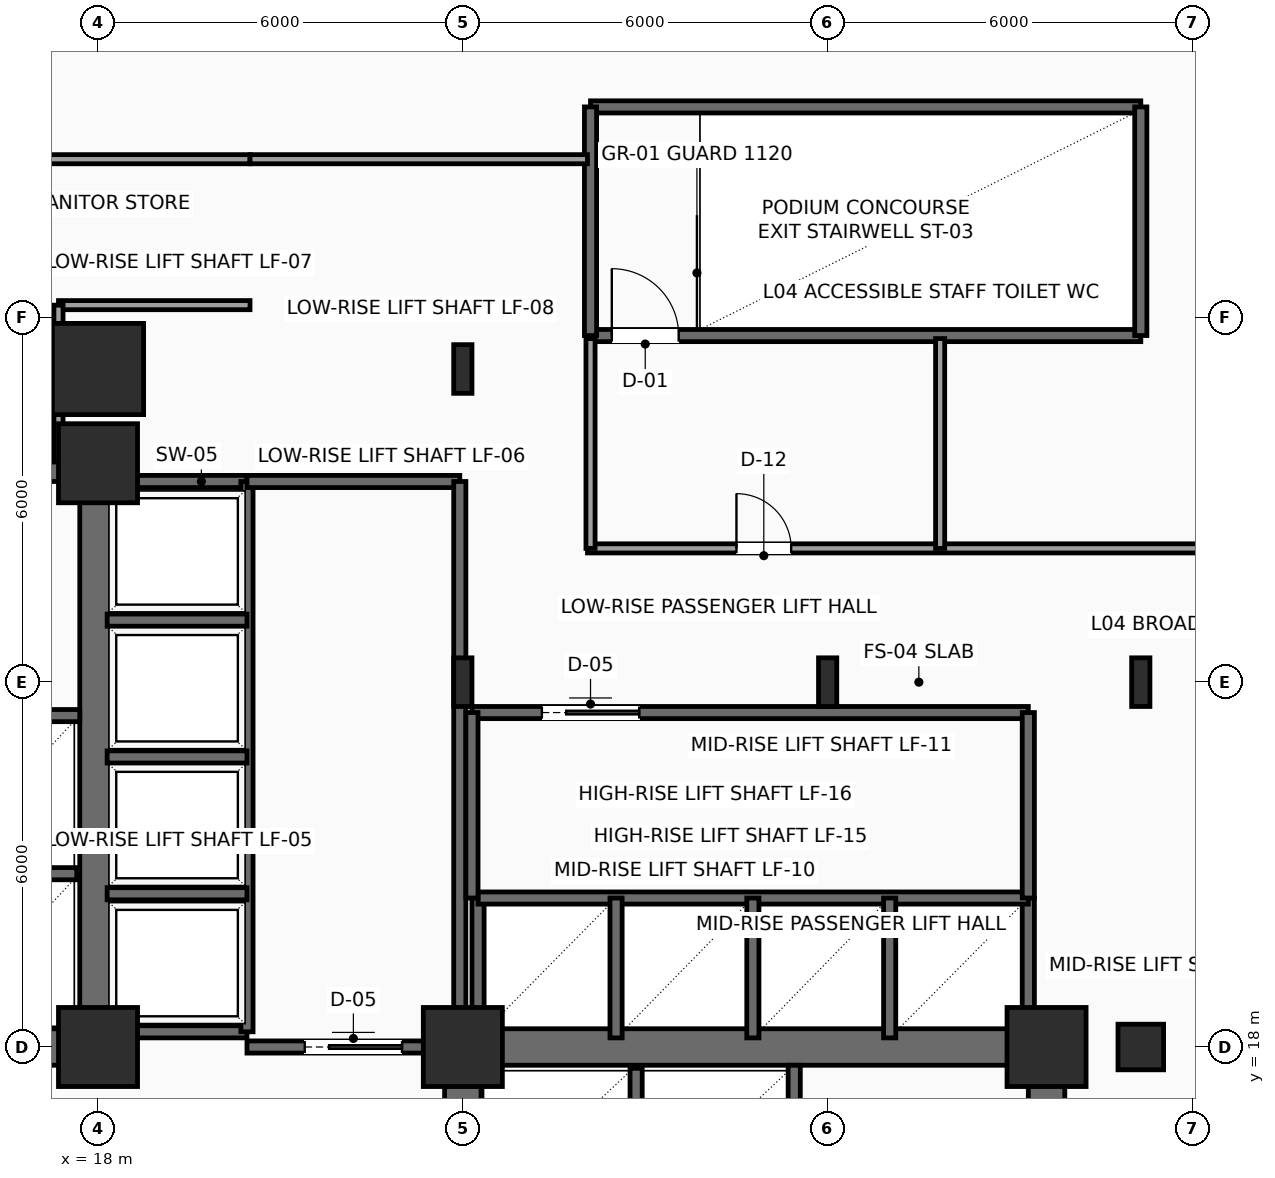
"""IFC4 building model, lengths in metres.
Left out: names, types, materials, properties, quantities, classifications, styles, units other than length and angle.
Written with IfcOpenShell. Run it as: python <this file> out.ifc"""

import sys

from ifc_helpers import new_model, si_unit, direction, frame, frame_2d, origin, origin_2d, place, context, subcontext, project, spatial, rectangle, hollow_rectangle, i_section, extrude, element, fill, save


model = new_model("IFC4")
c1 = context("Model", 3, precision=1e-05, world=origin(), true_north=direction((0.0, 1.0)))
c2 = subcontext(c1, "Body", "Model", "MODEL_VIEW")
j1 = project(units=[si_unit("LENGTHUNIT", "METRE"), si_unit("PLANEANGLEUNIT", "RADIAN")], contexts=[c1])
p1 = place(None, origin())
s1 = spatial("IfcSite", under=j1, at=p1, CompositionType="ELEMENT")
p2 = place(p1, origin())
s2 = spatial("IfcBuilding", under=s1, at=p2, CompositionType="ELEMENT")
p3 = place(p2, frame((0.0, 0.0, 21.9)))
s3 = spatial("IfcBuildingStorey", under=s2, at=p3, CompositionType="ELEMENT", Elevation=21.9)
for number, where, z_axis, x_axis in (
    (1, (18.0, 18.0, 0.0), (0.0, 0.0, 1.0), (1.0, 0.0, 0.0)),
    (2, (18.0, 27.6, 0.0), (0.0, 0.0, 1.0), (1.0, 0.0, 0.0)),
    (3, (24.0, 18.0, 0.0), (0.0, 0.0, 1.0), (1.0, 0.0, 0.0)),
    (4, (33.6, 18.0, 0.0), (0.0, 0.0, 1.0), (1.0, 0.0, 0.0)),
):
    element("IfcColumn", number, at=place(p3, frame(where, z_axis=z_axis, x_axis=x_axis)), inside=s3, PredefinedType="COLUMN", context=c2, shape_type="SweptSolid", body=[
        extrude(rectangle(XDim=1.3, YDim=1.3, at=origin_2d()), origin(), (0.0, 0.0, 1.0), 5.7),
    ])
p4 = place(p3, frame((18.0, 29.15, 0.0), z_axis=(0.0, 0.0, 1.0), x_axis=(1.0, 0.0, 0.0)))
e5 = element("IfcColumn", 5, at=p4, inside=s3, PredefinedType="COLUMN", context=c2, shape_type="SweptSolid", body=[
    extrude(rectangle(XDim=1.5, YDim=1.5, at=origin_2d()), origin(), (0.0, 0.0, 1.0), 5.35),
])
for number, where, z_axis, x_axis in (
    (6, (24.0, 24.0, 0.0), (0.0, 0.0, 1.0), (1.0, 0.0, 0.0)),
    (7, (24.0, 29.15, 0.0), (0.0, 0.0, 1.0), (1.0, 0.0, 0.0)),
    (8, (30.0, 24.0, 0.0), (0.0, 0.0, 1.0), (1.0, 0.0, 0.0)),
):
    element("IfcColumn", number, at=place(p3, frame(where, z_axis=z_axis, x_axis=x_axis)), inside=s3, PredefinedType="COLUMN", context=c2, shape_type="SweptSolid", body=[
        extrude(i_section(OverallWidth=0.3, OverallDepth=0.8, WebThickness=0.018, FlangeThickness=0.033, FilletRadius=0.03, at=origin_2d()), origin(), (0.0, 0.0, 1.0), 5.35),
    ])
p5 = place(p3, frame((35.15, 18.0, 0.0), z_axis=(0.0, 0.0, 1.0), x_axis=(1.0, 0.0, 0.0)))
e9 = element("IfcColumn", 9, at=p5, inside=s3, PredefinedType="COLUMN", context=c2, shape_type="SweptSolid", body=[
    extrude(hollow_rectangle(XDim=0.75, YDim=0.75, WallThickness=0.035, InnerFilletRadius=0.035, OuterFilletRadius=0.05, at=origin_2d()), origin(), (0.0, 0.0, 1.0), 5.35),
])
p6 = place(p3, frame((35.15, 24.0, 0.0), z_axis=(0.0, 0.0, 1.0), x_axis=(1.0, 0.0, 0.0)))
e10 = element("IfcColumn", 10, at=p6, inside=s3, PredefinedType="COLUMN", context=c2, shape_type="SweptSolid", body=[
    extrude(i_section(OverallWidth=0.3, OverallDepth=0.8, WebThickness=0.018, FlangeThickness=0.033, FilletRadius=0.03, at=origin_2d()), origin(), (0.0, 0.0, 1.0), 5.35),
])
p7 = place(p3, frame((6.0, 18.0, 0.0), z_axis=(0.0, 0.0, 1.0), x_axis=(1.0, 0.0, 0.0)))
e11 = element("IfcWall", 11, at=p7, inside=s3, PredefinedType="SHEAR", context=c2, shape_type="SweptSolid", body=[
    extrude(rectangle(XDim=12.0, YDim=0.6, at=frame_2d((6.0, 0.0))), origin(), (0.0, 0.0, 1.0), 5.35),
])
p8 = place(p7, frame((7.15, 0.0, 0.0)))
e12 = element("IfcOpeningElement", 12, at=p8, cuts=e11, PredefinedType="OPENING", context=c2, shape_type="SweptSolid", body=[
    extrude(rectangle(XDim=1.6, YDim=2.3, at=frame_2d((0.8, 1.15))), frame((0.0, 0.31, 0.0), z_axis=(0.0, -1.0, 0.0), x_axis=(1.0, 0.0, 0.0)), (0.0, 0.0, 1.0), 0.62),
])
p9 = place(p3, frame((6.0, 27.6, 0.0), z_axis=(0.0, 0.0, 1.0), x_axis=(1.0, 0.0, 0.0)))
e13 = element("IfcWall", 13, at=p9, inside=s3, PredefinedType="SHEAR", context=c2, shape_type="SweptSolid", body=[
    extrude(rectangle(XDim=12.0, YDim=0.6, at=frame_2d((6.0, 0.0))), origin(), (0.0, 0.0, 1.0), 5.35),
])
p10 = place(p9, frame((10.2, 0.0, 0.0)))
e14 = element("IfcOpeningElement", 14, at=p10, cuts=e13, PredefinedType="OPENING", context=c2, shape_type="SweptSolid", body=[
    extrude(rectangle(XDim=0.9, YDim=2.15, at=frame_2d((0.45, 1.075))), frame((0.0, 0.31, 0.0), z_axis=(0.0, -1.0, 0.0), x_axis=(1.0, 0.0, 0.0)), (0.0, 0.0, 1.0), 0.62),
])
for number, where, z_axis, x_axis in (
    (15, (18.0, 18.0, 0.0), (0.0, 0.0, 1.0), (0.0, 1.0, 0.0)),
    (16, (24.0, 18.0, 0.0), (0.0, 0.0, 1.0), (1.0, 0.0, 0.0)),
):
    element("IfcWall", number, at=place(p3, frame(where, z_axis=z_axis, x_axis=x_axis)), inside=s3, PredefinedType="SHEAR", context=c2, shape_type="SweptSolid", body=[
        extrude(rectangle(XDim=9.6, YDim=0.6, at=frame_2d((4.8, 0.0))), origin(), (0.0, 0.0, 1.0), 5.35),
    ])
p11 = place(p3, frame((24.0, 6.0, 0.0), z_axis=(0.0, 0.0, 1.0), x_axis=(0.0, 1.0, 0.0)))
e17 = element("IfcWall", 17, at=p11, inside=s3, PredefinedType="SHEAR", context=c2, shape_type="SweptSolid", body=[
    extrude(rectangle(XDim=12.0, YDim=0.6, at=frame_2d((6.0, 0.0))), origin(), (0.0, 0.0, 1.0), 5.35),
])
p12 = place(p11, frame((7.15, 0.0, 0.0)))
e18 = element("IfcOpeningElement", 18, at=p12, cuts=e17, PredefinedType="OPENING", context=c2, shape_type="SweptSolid", body=[
    extrude(rectangle(XDim=1.6, YDim=2.3, at=frame_2d((0.8, 1.15))), frame((0.0, 0.31, 0.0), z_axis=(0.0, -1.0, 0.0), x_axis=(1.0, 0.0, 0.0)), (0.0, 0.0, 1.0), 0.62),
])
p13 = place(p3, frame((33.6, 6.0, 0.0), z_axis=(0.0, 0.0, 1.0), x_axis=(0.0, 1.0, 0.0)))
e19 = element("IfcWall", 19, at=p13, inside=s3, PredefinedType="SHEAR", context=c2, shape_type="SweptSolid", body=[
    extrude(rectangle(XDim=12.0, YDim=0.6, at=frame_2d((6.0, 0.0))), origin(), (0.0, 0.0, 1.0), 5.35),
])
p14 = place(p13, frame((10.2, 0.0, 0.0)))
e20 = element("IfcOpeningElement", 20, at=p14, cuts=e19, PredefinedType="OPENING", context=c2, shape_type="SweptSolid", body=[
    extrude(rectangle(XDim=0.9, YDim=2.15, at=frame_2d((0.45, 1.075))), frame((0.0, 0.31, 0.0), z_axis=(0.0, -1.0, 0.0), x_axis=(1.0, 0.0, 0.0)), (0.0, 0.0, 1.0), 0.62),
])
p15 = place(p3, frame((15.25, 20.85, 0.0), z_axis=(0.0, 0.0, 1.0), x_axis=(1.0, 0.0, 0.0)))
e21 = element("IfcWall", 21, at=p15, inside=s3, PredefinedType="SHEAR", context=c2, shape_type="SweptSolid", body=[
    extrude(rectangle(XDim=2.4, YDim=0.2, at=frame_2d((1.2, 0.0))), origin(), (0.0, 0.0, 1.0), 5.35),
])
p16 = place(p3, frame((15.25, 23.45, 0.0), z_axis=(0.0, 0.0, 1.0), x_axis=(1.0, 0.0, 0.0)))
e22 = element("IfcWall", 22, at=p16, inside=s3, PredefinedType="SHEAR", context=c2, shape_type="SweptSolid", body=[
    extrude(rectangle(XDim=2.45, YDim=0.2, at=frame_2d((1.225, 0.0))), origin(), (0.0, 0.0, 1.0), 5.35),
])
p17 = place(p3, frame((26.85, 15.25, 0.0), z_axis=(0.0, 0.0, 1.0), x_axis=(0.0, 1.0, 0.0)))
e23 = element("IfcWall", 23, at=p17, inside=s3, PredefinedType="SHEAR", context=c2, shape_type="SweptSolid", body=[
    extrude(rectangle(XDim=2.4, YDim=0.2, at=frame_2d((1.2, 0.0))), origin(), (0.0, 0.0, 1.0), 5.35),
])
p18 = place(p3, frame((29.45, 15.25, 0.0), z_axis=(0.0, 0.0, 1.0), x_axis=(0.0, 1.0, 0.0)))
e24 = element("IfcWall", 24, at=p18, inside=s3, PredefinedType="SHEAR", context=c2, shape_type="SweptSolid", body=[
    extrude(rectangle(XDim=2.45, YDim=0.2, at=frame_2d((1.225, 0.0))), origin(), (0.0, 0.0, 1.0), 5.35),
])
for number, where, z_axis, x_axis in (
    (25, (18.1, 27.3, 0.0), (0.0, 0.0, 1.0), (1.0, 0.0, 0.0)),
    (26, (18.1, 18.25, 0.0), (0.0, 0.0, 1.0), (1.0, 0.0, 0.0)),
):
    element("IfcWall", number, at=place(p3, frame(where, z_axis=z_axis, x_axis=x_axis)), inside=s3, PredefinedType="SHEAR", context=c2, shape_type="SweptSolid", body=[
        extrude(rectangle(XDim=2.35, YDim=0.2, at=frame_2d((1.175, 0.0))), origin(), (0.0, 0.0, 1.0), 5.35),
    ])
p19 = place(p3, frame((20.45, 18.25, 0.0), z_axis=(0.0, 0.0, 1.0), x_axis=(0.0, 1.0, 0.0)))
e27 = element("IfcWall", 27, at=p19, inside=s3, PredefinedType="SHEAR", context=c2, shape_type="SweptSolid", body=[
    extrude(rectangle(XDim=9.05, YDim=0.2, at=frame_2d((4.525, 0.0))), origin(), (0.0, 0.0, 1.0), 5.35),
])
for number, where, z_axis, x_axis in (
    (28, (18.15, 20.52, 0.0), (0.0, 0.0, 1.0), (1.0, 0.0, 0.0)),
    (29, (18.15, 22.77, 0.0), (0.0, 0.0, 1.0), (1.0, 0.0, 0.0)),
    (30, (18.15, 25.02, 0.0), (0.0, 0.0, 1.0), (1.0, 0.0, 0.0)),
):
    element("IfcWall", number, at=place(p3, frame(where, z_axis=z_axis, x_axis=x_axis)), inside=s3, PredefinedType="SHEAR", context=c2, shape_type="SweptSolid", body=[
        extrude(rectangle(XDim=2.3, YDim=0.2, at=frame_2d((1.15, 0.0))), origin(), (0.0, 0.0, 1.0), 5.35),
    ])
p20 = place(p3, frame((20.45, 18.0, 0.0), z_axis=(0.0, 0.0, 1.0), x_axis=(1.0, 0.0, 0.0)))
e31 = element("IfcWall", 31, at=p20, inside=s3, PredefinedType="SHEAR", context=c2, shape_type="SweptSolid", body=[
    extrude(rectangle(XDim=3.5, YDim=0.2, at=frame_2d((1.75, 0.0))), origin(), (0.0, 0.0, 1.0), 5.35),
])
p21 = place(p20, frame((0.95, 0.0, 0.0)))
e32 = element("IfcOpeningElement", 32, at=p21, cuts=e31, PredefinedType="OPENING", context=c2, shape_type="SweptSolid", body=[
    extrude(rectangle(XDim=1.6, YDim=2.3, at=frame_2d((0.8, 1.15))), frame((0.0, 0.11, 0.0), z_axis=(0.0, -1.0, 0.0), x_axis=(1.0, 0.0, 0.0)), (0.0, 0.0, 1.0), 0.22),
])
p22 = place(p3, frame((20.45, 27.3, 0.0), z_axis=(0.0, 0.0, 1.0), x_axis=(1.0, 0.0, 0.0)))
e33 = element("IfcWall", 33, at=p22, inside=s3, PredefinedType="SHEAR", context=c2, shape_type="SweptSolid", body=[
    extrude(rectangle(XDim=3.5, YDim=0.2, at=frame_2d((1.75, 0.0))), origin(), (0.0, 0.0, 1.0), 5.35),
])
p23 = place(p3, frame((23.95, 18.0, 0.0), z_axis=(0.0, 0.0, 1.0), x_axis=(0.0, 1.0, 0.0)))
e34 = element("IfcWall", 34, at=p23, inside=s3, PredefinedType="SHEAR", context=c2, shape_type="SweptSolid", body=[
    extrude(rectangle(XDim=9.3, YDim=0.2, at=frame_2d((4.65, 0.0))), origin(), (0.0, 0.0, 1.0), 5.35),
])
for number, where, z_axis, x_axis in (
    (35, (33.3, 18.1, 0.0), (0.0, 0.0, 1.0), (0.0, 1.0, 0.0)),
    (36, (24.25, 18.1, 0.0), (0.0, 0.0, 1.0), (0.0, 1.0, 0.0)),
):
    element("IfcWall", number, at=place(p3, frame(where, z_axis=z_axis, x_axis=x_axis)), inside=s3, PredefinedType="SHEAR", context=c2, shape_type="SweptSolid", body=[
        extrude(rectangle(XDim=2.35, YDim=0.2, at=frame_2d((1.175, 0.0))), origin(), (0.0, 0.0, 1.0), 5.35),
    ])
p24 = place(p3, frame((24.25, 20.45, 0.0), z_axis=(0.0, 0.0, 1.0), x_axis=(1.0, 0.0, 0.0)))
e37 = element("IfcWall", 37, at=p24, inside=s3, PredefinedType="SHEAR", context=c2, shape_type="SweptSolid", body=[
    extrude(rectangle(XDim=9.05, YDim=0.2, at=frame_2d((4.525, 0.0))), origin(), (0.0, 0.0, 1.0), 5.35),
])
for number, where, z_axis, x_axis in (
    (38, (26.52, 18.15, 0.0), (0.0, 0.0, 1.0), (0.0, 1.0, 0.0)),
    (39, (28.77, 18.15, 0.0), (0.0, 0.0, 1.0), (0.0, 1.0, 0.0)),
    (40, (31.02, 18.15, 0.0), (0.0, 0.0, 1.0), (0.0, 1.0, 0.0)),
):
    element("IfcWall", number, at=place(p3, frame(where, z_axis=z_axis, x_axis=x_axis)), inside=s3, PredefinedType="SHEAR", context=c2, shape_type="SweptSolid", body=[
        extrude(rectangle(XDim=2.3, YDim=0.2, at=frame_2d((1.15, 0.0))), origin(), (0.0, 0.0, 1.0), 5.35),
    ])
p25 = place(p3, frame((24.15, 23.5, 0.0), z_axis=(0.0, 0.0, 1.0), x_axis=(1.0, 0.0, 0.0)))
e41 = element("IfcWall", 41, at=p25, inside=s3, PredefinedType="SHEAR", context=c2, shape_type="SweptSolid", body=[
    extrude(rectangle(XDim=9.15, YDim=0.2, at=frame_2d((4.575, 0.0))), origin(), (0.0, 0.0, 1.0), 5.35),
])
p26 = place(p25, frame((1.15, 0.0, 0.0)))
e42 = element("IfcOpeningElement", 42, at=p26, cuts=e41, PredefinedType="OPENING", context=c2, shape_type="SweptSolid", body=[
    extrude(rectangle(XDim=1.6, YDim=2.3, at=frame_2d((0.8, 1.15))), frame((0.0, 0.11, 0.0), z_axis=(0.0, -1.0, 0.0), x_axis=(1.0, 0.0, 0.0)), (0.0, 0.0, 1.0), 0.22),
])
for number, where, z_axis, x_axis in (
    (43, (33.3, 20.45, 0.0), (0.0, 0.0, 1.0), (0.0, 1.0, 0.0)),
    (44, (24.15, 20.45, 0.0), (0.0, 0.0, 1.0), (0.0, 1.0, 0.0)),
):
    element("IfcWall", number, at=place(p3, frame(where, z_axis=z_axis, x_axis=x_axis)), inside=s3, PredefinedType="SHEAR", context=c2, shape_type="SweptSolid", body=[
        extrude(rectangle(XDim=3.05, YDim=0.2, at=frame_2d((1.525, 0.0))), origin(), (0.0, 0.0, 1.0), 5.35),
    ])
p27 = place(p3, frame((26.1, 29.7, 0.0), z_axis=(0.0, 0.0, 1.0), x_axis=(1.0, 0.0, 0.0)))
e45 = element("IfcWall", 45, at=p27, inside=s3, PredefinedType="SHEAR", context=c2, shape_type="SweptSolid", body=[
    extrude(rectangle(XDim=9.05, YDim=0.2, at=frame_2d((4.525, 0.0))), origin(), (0.0, 0.0, 1.0), 5.35),
])
p28 = place(p27, frame((0.35, 0.0, 0.0)))
e46 = element("IfcOpeningElement", 46, at=p28, cuts=e45, PredefinedType="OPENING", context=c2, shape_type="SweptSolid", body=[
    extrude(rectangle(XDim=1.1, YDim=2.2, at=frame_2d((0.55, 1.1))), frame((0.0, 0.11, 0.0), z_axis=(0.0, -1.0, 0.0), x_axis=(1.0, 0.0, 0.0)), (0.0, 0.0, 1.0), 0.22),
])
p29 = place(p3, frame((26.1, 33.46, 0.0), z_axis=(0.0, 0.0, 1.0), x_axis=(1.0, 0.0, 0.0)))
e47 = element("IfcWall", 47, at=p29, inside=s3, PredefinedType="SHEAR", context=c2, shape_type="SweptSolid", body=[
    extrude(rectangle(XDim=9.05, YDim=0.2, at=frame_2d((4.525, 0.0))), origin(), (0.0, 0.0, 1.0), 5.35),
])
for number, where, z_axis, x_axis in (
    (48, (26.1, 29.7, 0.0), (0.0, 0.0, 1.0), (0.0, 1.0, 0.0)),
    (49, (35.15, 29.7, 0.0), (0.0, 0.0, 1.0), (0.0, 1.0, 0.0)),
):
    element("IfcWall", number, at=place(p3, frame(where, z_axis=z_axis, x_axis=x_axis)), inside=s3, PredefinedType="SHEAR", context=c2, shape_type="SweptSolid", body=[
        extrude(rectangle(XDim=3.76, YDim=0.2, at=frame_2d((1.88, 0.0))), origin(), (0.0, 0.0, 1.0), 5.35),
    ])
p30 = place(p3, frame((20.5, 30.2, 0.0), z_axis=(0.0, 0.0, 1.0), x_axis=(-1.0, 0.0, 0.0)))
e50 = element("IfcWall", 50, at=p30, inside=s3, PredefinedType="PARTITIONING", context=c2, shape_type="SweptSolid", body=[
    extrude(rectangle(XDim=3.15, YDim=0.15, at=frame_2d((1.575, 0.0))), origin(), (0.0, 0.0, 1.0), 5.35),
])
p31 = place(p3, frame((17.35, 30.2, 0.0), z_axis=(0.0, 0.0, 1.0), x_axis=(0.0, -1.0, 0.0)))
e51 = element("IfcWall", 51, at=p31, inside=s3, PredefinedType="PARTITIONING", context=c2, shape_type="SweptSolid", body=[
    extrude(rectangle(XDim=2.58, YDim=0.15, at=frame_2d((1.29, 0.0))), origin(), (0.0, 0.0, 1.0), 5.35),
])
p32 = place(p3, frame((5.9, 32.6, 0.0), z_axis=(0.0, 0.0, 1.0), x_axis=(1.0, 0.0, 0.0)))
e52 = element("IfcWall", 52, at=p32, inside=s3, PredefinedType="PARTITIONING", context=c2, shape_type="SweptSolid", body=[
    extrude(rectangle(XDim=14.6, YDim=0.15, at=frame_2d((7.3, 0.0))), origin(), (0.0, 0.0, 1.0), 5.35),
])
p33 = place(p32, frame((2.975, 0.0, 0.0)))
e53 = element("IfcOpeningElement", 53, at=p33, cuts=e52, PredefinedType="OPENING", context=c2, shape_type="SweptSolid", body=[
    extrude(rectangle(XDim=0.95, YDim=2.15, at=frame_2d((0.475, 1.075))), frame((0.0, 0.085, 0.0), z_axis=(0.0, -1.0, 0.0), x_axis=(1.0, 0.0, 0.0)), (0.0, 0.0, 1.0), 0.17),
])
p34 = place(p32, frame((10.275, 0.0, 0.0)))
e54 = element("IfcOpeningElement", 54, at=p34, cuts=e52, PredefinedType="OPENING", context=c2, shape_type="SweptSolid", body=[
    extrude(rectangle(XDim=0.95, YDim=2.15, at=frame_2d((0.475, 1.075))), frame((0.0, 0.085, 0.0), z_axis=(0.0, -1.0, 0.0), x_axis=(1.0, 0.0, 0.0)), (0.0, 0.0, 1.0), 0.17),
])
p35 = place(p3, frame((20.5, 32.6, 0.0), z_axis=(0.0, 0.0, 1.0), x_axis=(1.0, 0.0, 0.0)))
e55 = element("IfcWall", 55, at=p35, inside=s3, PredefinedType="PARTITIONING", context=c2, shape_type="SweptSolid", body=[
    extrude(rectangle(XDim=5.55, YDim=0.15, at=frame_2d((2.775, 0.0))), origin(), (0.0, 0.0, 1.0), 5.35),
])
p36 = place(p3, frame((26.05, 26.2, 0.0), z_axis=(0.0, 0.0, 1.0), x_axis=(1.0, 0.0, 0.0)))
e56 = element("IfcWall", 56, at=p36, inside=s3, PredefinedType="PARTITIONING", context=c2, shape_type="SweptSolid", body=[
    extrude(rectangle(XDim=33.55, YDim=0.15, at=frame_2d((16.775, 0.0))), origin(), (0.0, 0.0, 1.0), 5.35),
])
p37 = place(p36, frame((2.45, 0.0, 0.0)))
e57 = element("IfcOpeningElement", 57, at=p37, cuts=e56, PredefinedType="OPENING", context=c2, shape_type="SweptSolid", body=[
    extrude(rectangle(XDim=0.9, YDim=2.1, at=frame_2d((0.45, 1.05))), frame((0.0, 0.085, 0.0), z_axis=(0.0, -1.0, 0.0), x_axis=(1.0, 0.0, 0.0)), (0.0, 0.0, 1.0), 0.17),
])
p38 = place(p36, frame((11.7, 0.0, 0.0)))
e58 = element("IfcOpeningElement", 58, at=p38, cuts=e56, PredefinedType="OPENING", context=c2, shape_type="SweptSolid", body=[
    extrude(rectangle(XDim=0.95, YDim=2.15, at=frame_2d((0.475, 1.075))), frame((0.0, 0.085, 0.0), z_axis=(0.0, -1.0, 0.0), x_axis=(1.0, 0.0, 0.0)), (0.0, 0.0, 1.0), 0.17),
])
p39 = place(p36, frame((18.375, 0.0, 0.0)))
e59 = element("IfcOpeningElement", 59, at=p39, cuts=e56, PredefinedType="OPENING", context=c2, shape_type="SweptSolid", body=[
    extrude(rectangle(XDim=0.95, YDim=2.15, at=frame_2d((0.475, 1.075))), frame((0.0, 0.085, 0.0), z_axis=(0.0, -1.0, 0.0), x_axis=(1.0, 0.0, 0.0)), (0.0, 0.0, 1.0), 0.17),
])
p40 = place(p36, frame((25.375, 0.0, 0.0)))
e60 = element("IfcOpeningElement", 60, at=p40, cuts=e56, PredefinedType="OPENING", context=c2, shape_type="SweptSolid", body=[
    extrude(rectangle(XDim=0.95, YDim=2.15, at=frame_2d((0.475, 1.075))), frame((0.0, 0.085, 0.0), z_axis=(0.0, -1.0, 0.0), x_axis=(1.0, 0.0, 0.0)), (0.0, 0.0, 1.0), 0.17),
])
p41 = place(p36, frame((30.875, 0.0, 0.0)))
e61 = element("IfcOpeningElement", 61, at=p41, cuts=e56, PredefinedType="OPENING", context=c2, shape_type="SweptSolid", body=[
    extrude(rectangle(XDim=0.95, YDim=2.15, at=frame_2d((0.475, 1.075))), frame((0.0, 0.085, 0.0), z_axis=(0.0, -1.0, 0.0), x_axis=(1.0, 0.0, 0.0)), (0.0, 0.0, 1.0), 0.17),
])
for number, where, z_axis, x_axis in (
    (62, (26.1, 26.2, 0.0), (0.0, 0.0, 1.0), (0.0, 1.0, 0.0)),
    (63, (31.85, 26.2, 0.0), (0.0, 0.0, 1.0), (0.0, 1.0, 0.0)),
):
    element("IfcWall", number, at=place(p3, frame(where, z_axis=z_axis, x_axis=x_axis)), inside=s3, PredefinedType="PARTITIONING", context=c2, shape_type="SweptSolid", body=[
        extrude(rectangle(XDim=3.45, YDim=0.15, at=frame_2d((1.725, 0.0))), origin(), (0.0, 0.0, 1.0), 5.35),
    ])
p42 = place(p21, origin())
e64 = element("IfcDoor", 64, at=p42, inside=s3, OperationType="DOUBLE_DOOR_SLIDING", PredefinedType="DOOR", context=c2, shape_type="SweptSolid", body=[
    extrude(rectangle(XDim=1.6, YDim=2.3, at=frame_2d((0.8, 1.15))), frame((0.0, 0.025, 0.0), z_axis=(0.0, -1.0, 0.0), x_axis=(1.0, 0.0, 0.0)), (0.0, 0.0, 1.0), 0.05),
])
fill(e32, e64)
p43 = place(p26, origin())
e65 = element("IfcDoor", 65, at=p43, inside=s3, OperationType="DOUBLE_DOOR_SLIDING", PredefinedType="DOOR", context=c2, shape_type="SweptSolid", body=[
    extrude(rectangle(XDim=1.6, YDim=2.3, at=frame_2d((0.8, 1.15))), frame((0.0, 0.025, 0.0), z_axis=(0.0, -1.0, 0.0), x_axis=(1.0, 0.0, 0.0)), (0.0, 0.0, 1.0), 0.05),
])
fill(e42, e65)
p44 = place(p28, origin())
e66 = element("IfcDoor", 66, at=p44, inside=s3, OperationType="SINGLE_SWING_LEFT", PredefinedType="DOOR", context=c2, shape_type="SweptSolid", body=[
    extrude(rectangle(XDim=1.1, YDim=2.2, at=frame_2d((0.55, 1.1))), frame((0.0, 0.025, 0.0), z_axis=(0.0, -1.0, 0.0), x_axis=(1.0, 0.0, 0.0)), (0.0, 0.0, 1.0), 0.05),
])
fill(e46, e66)
p45 = place(p37, origin())
e67 = element("IfcDoor", 67, at=p45, inside=s3, OperationType="SINGLE_SWING_LEFT", PredefinedType="DOOR", context=c2, shape_type="SweptSolid", body=[
    extrude(rectangle(XDim=0.9, YDim=2.1, at=frame_2d((0.45, 1.05))), frame((0.0, 0.025, 0.0), z_axis=(0.0, -1.0, 0.0), x_axis=(1.0, 0.0, 0.0)), (0.0, 0.0, 1.0), 0.05),
])
fill(e57, e67)
save(model, sys.argv[1])
